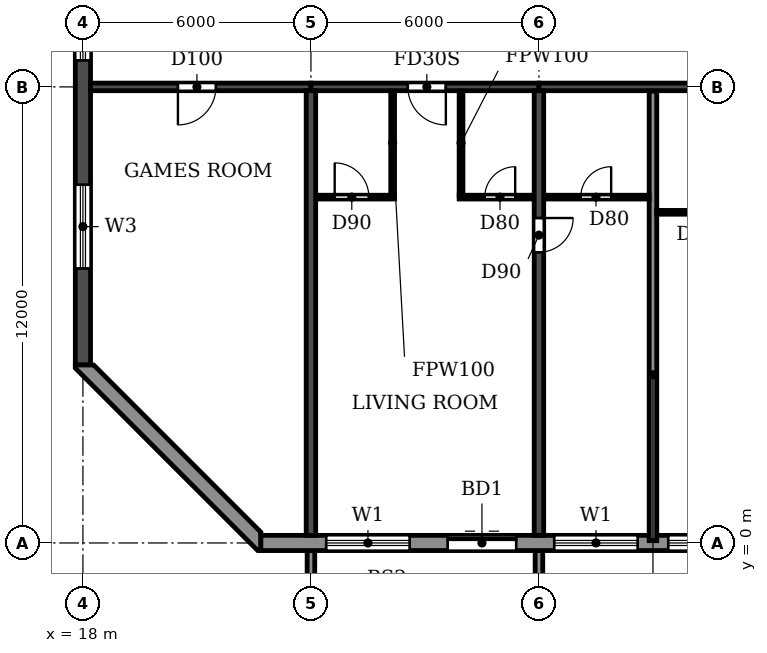
"""IFC4 building model, lengths in metres.
Left out: names, types, materials, properties, quantities, classifications, styles, units other than length and angle.
Written with IfcOpenShell. Run it as: python <this file> out.ifc"""

import sys

from ifc_helpers import new_model, si_unit, direction, frame, frame_2d, origin, place, context, subcontext, project, spatial, polyline, rectangle, outline, extrude, source, transform, mapped, element, fill, save


model = new_model("IFC4")
c1 = context("Model", 3, precision=1e-05, world=origin(), true_north=direction((0.0, 1.0)))
c2 = subcontext(c1, "Body", "Model", "MODEL_VIEW")
j1 = project(units=[si_unit("LENGTHUNIT", "METRE"), si_unit("PLANEANGLEUNIT", "RADIAN")], contexts=[c1])
p1 = place(None, origin())
s1 = spatial("IfcSite", under=j1, at=p1, CompositionType="ELEMENT")
p2 = place(p1, origin())
s2 = spatial("IfcBuilding", under=s1, at=p2, CompositionType="ELEMENT")
p3 = place(p2, frame((0.0, 0.0, 241.2)))
s3 = spatial("IfcBuildingStorey", under=s2, at=p3, CompositionType="ELEMENT", Elevation=241.2)
p4 = place(p3, frame((24.0, 0.2, 0.0), z_axis=(0.0, 0.0, 1.0), x_axis=(0.0, 1.0, 0.0)))
e1 = element("IfcWall", 1, at=p4, inside=s3, PredefinedType="SHEAR", context=c2, shape_type="SweptSolid", body=[
    extrude(rectangle(XDim=11.7, YDim=0.25, at=frame_2d((5.85, 0.0))), origin(), (0.0, 0.0, 1.0), 3.08),
])
p5 = place(p3, frame((30.0, 0.2, 0.0), z_axis=(0.0, 0.0, 1.0), x_axis=(0.0, 1.0, 0.0)))
e2 = element("IfcWall", 2, at=p5, inside=s3, PredefinedType="SHEAR", context=c2, shape_type="SweptSolid", body=[
    extrude(rectangle(XDim=11.7, YDim=0.25, at=frame_2d((5.85, 0.0))), origin(), (0.0, 0.0, 1.0), 3.08),
])
p6 = place(p5, frame((7.45, 0.0, 0.0)))
e3 = element("IfcOpeningElement", 3, at=p6, cuts=e2, PredefinedType="OPENING", context=c2, shape_type="SweptSolid", body=[
    extrude(rectangle(XDim=0.9, YDim=2.1, at=frame_2d((0.45, 1.05))), frame((0.0, 0.135, 0.0), z_axis=(0.0, -1.0, 0.0), x_axis=(1.0, 0.0, 0.0)), (0.0, 0.0, 1.0), 0.27),
])
p7 = place(p3, frame((18.0, 4.683, 0.0), z_axis=(0.0, 0.0, 1.0), x_axis=(0.0, 1.0, 0.0)))
e4 = element("IfcWall", 4, at=p7, inside=s3, PredefinedType="SHEAR", context=c2, shape_type="SweptSolid", body=[
    extrude(rectangle(XDim=31.834, YDim=0.4, at=frame_2d((15.917, 0.0))), origin(), (0.0, 0.0, 1.0), 3.08),
])
p8 = place(p7, frame((23.817, 0.0, 0.9)))
e5 = element("IfcOpeningElement", 5, at=p8, cuts=e4, PredefinedType="OPENING", context=c2, shape_type="SweptSolid", body=[
    extrude(rectangle(XDim=1.2, YDim=1.5, at=frame_2d((0.6, 0.75))), frame((0.0, 0.21, 0.0), z_axis=(0.0, -1.0, 0.0), x_axis=(1.0, 0.0, 0.0)), (0.0, 0.0, 1.0), 0.42),
])
p9 = place(p7, frame((8.017, 0.0, 0.9)))
e6 = element("IfcOpeningElement", 6, at=p9, cuts=e4, PredefinedType="OPENING", context=c2, shape_type="SweptSolid", body=[
    extrude(rectangle(XDim=1.2, YDim=1.5, at=frame_2d((0.6, 0.75))), frame((0.0, 0.21, 0.0), z_axis=(0.0, -1.0, 0.0), x_axis=(1.0, 0.0, 0.0)), (0.0, 0.0, 1.0), 0.42),
])
p10 = place(p7, frame((27.694, 0.0, 0.6)))
e7 = element("IfcOpeningElement", 7, at=p10, cuts=e4, PredefinedType="OPENING", context=c2, shape_type="SweptSolid", body=[
    extrude(rectangle(XDim=2.2, YDim=1.8, at=frame_2d((1.1, 0.9))), frame((0.0, 0.21, 0.0), z_axis=(0.0, -1.0, 0.0), x_axis=(1.0, 0.0, 0.0)), (0.0, 0.0, 1.0), 0.42),
])
p11 = place(p7, frame((2.541, 0.0, 0.6)))
e8 = element("IfcOpeningElement", 8, at=p11, cuts=e4, PredefinedType="OPENING", context=c2, shape_type="SweptSolid", body=[
    extrude(rectangle(XDim=2.2, YDim=1.8, at=frame_2d((1.1, 0.9))), frame((0.0, 0.21, 0.0), z_axis=(0.0, -1.0, 0.0), x_axis=(1.0, 0.0, 0.0)), (0.0, 0.0, 1.0), 0.42),
])
p12 = place(p7, frame((15.917, 0.0, 0.9)))
e9 = element("IfcOpeningElement", 9, at=p12, cuts=e4, PredefinedType="OPENING", context=c2, shape_type="SweptSolid", body=[
    extrude(rectangle(XDim=1.2, YDim=1.5, at=frame_2d((0.6, 0.75))), frame((0.0, 0.21, 0.0), z_axis=(0.0, -1.0, 0.0), x_axis=(1.0, 0.0, 0.0)), (0.0, 0.0, 1.0), 0.42),
])
p13 = place(p3, frame((18.2, 12.0, 0.0), z_axis=(0.0, 0.0, 1.0), x_axis=(1.0, 0.0, 0.0)))
e10 = element("IfcWall", 10, at=p13, inside=s3, PredefinedType="SHEAR", context=c2, shape_type="SweptSolid", body=[
    extrude(rectangle(XDim=5.8, YDim=0.2, at=frame_2d((2.9, 0.0))), origin(), (0.0, 0.0, 1.0), 2.48),
])
p14 = place(p13, frame((2.3, 0.0, 0.0)))
e11 = element("IfcOpeningElement", 11, at=p14, cuts=e10, PredefinedType="OPENING", context=c2, shape_type="SweptSolid", body=[
    extrude(rectangle(XDim=1.0, YDim=2.1, at=frame_2d((0.5, 1.05))), frame((0.0, 0.11, 0.0), z_axis=(0.0, -1.0, 0.0), x_axis=(1.0, 0.0, 0.0)), (0.0, 0.0, 1.0), 0.22),
])
p15 = place(p3, frame((24.0, 12.0, 0.0), z_axis=(0.0, 0.0, 1.0), x_axis=(1.0, 0.0, 0.0)))
e12 = element("IfcWall", 12, at=p15, inside=s3, PredefinedType="SHEAR", context=c2, shape_type="SweptSolid", body=[
    extrude(rectangle(XDim=6.0, YDim=0.2, at=frame_2d((3.0, 0.0))), origin(), (0.0, 0.0, 1.0), 2.48),
])
p16 = place(p15, frame((2.55, 0.0, 0.0)))
e13 = element("IfcOpeningElement", 13, at=p16, cuts=e12, PredefinedType="OPENING", context=c2, shape_type="SweptSolid", body=[
    extrude(rectangle(XDim=1.0, YDim=2.1, at=frame_2d((0.5, 1.05))), frame((0.0, 0.11, 0.0), z_axis=(0.0, -1.0, 0.0), x_axis=(1.0, 0.0, 0.0)), (0.0, 0.0, 1.0), 0.22),
])
p17 = place(p3, frame((30.0, 12.0, 0.0), z_axis=(0.0, 0.0, 1.0), x_axis=(1.0, 0.0, 0.0)))
e14 = element("IfcWall", 14, at=p17, inside=s3, PredefinedType="SHEAR", context=c2, shape_type="SweptSolid", body=[
    extrude(rectangle(XDim=6.0, YDim=0.2, at=frame_2d((3.0, 0.0))), origin(), (0.0, 0.0, 1.0), 2.48),
])
p18 = place(p3, frame((22.683, 0.0, 0.0), z_axis=(0.0, 0.0, 1.0), x_axis=(1.0, 0.0, 0.0)))
e15 = element("IfcWall", 15, at=p18, inside=s3, PredefinedType="STANDARD", context=c2, shape_type="SweptSolid", body=[
    extrude(rectangle(XDim=56.634, YDim=0.4, at=frame_2d((28.317, 0.0))), origin(), (0.0, 0.0, 1.0), 3.08),
])
p19 = place(p18, frame((1.717, 0.0, 0.9)))
e16 = element("IfcOpeningElement", 16, at=p19, cuts=e15, PredefinedType="OPENING", context=c2, shape_type="SweptSolid", body=[
    extrude(rectangle(XDim=2.2, YDim=1.5, at=frame_2d((1.1, 0.75))), frame((0.0, 0.21, 0.0), z_axis=(0.0, -1.0, 0.0), x_axis=(1.0, 0.0, 0.0)), (0.0, 0.0, 1.0), 0.42),
])
p20 = place(p18, frame((4.917, 0.0, 0.0)))
e17 = element("IfcOpeningElement", 17, at=p20, cuts=e15, PredefinedType="OPENING", context=c2, shape_type="SweptSolid", body=[
    extrude(rectangle(XDim=1.8, YDim=2.4, at=frame_2d((0.9, 1.2))), frame((0.0, 0.21, 0.0), z_axis=(0.0, -1.0, 0.0), x_axis=(1.0, 0.0, 0.0)), (0.0, 0.0, 1.0), 0.42),
])
p21 = place(p18, frame((7.717, 0.0, 0.9)))
e18 = element("IfcOpeningElement", 18, at=p21, cuts=e15, PredefinedType="OPENING", context=c2, shape_type="SweptSolid", body=[
    extrude(rectangle(XDim=2.2, YDim=1.5, at=frame_2d((1.1, 0.75))), frame((0.0, 0.21, 0.0), z_axis=(0.0, -1.0, 0.0), x_axis=(1.0, 0.0, 0.0)), (0.0, 0.0, 1.0), 0.42),
])
p22 = place(p18, frame((10.717, 0.0, 0.9)))
e19 = element("IfcOpeningElement", 19, at=p22, cuts=e15, PredefinedType="OPENING", context=c2, shape_type="SweptSolid", body=[
    extrude(rectangle(XDim=2.2, YDim=1.5, at=frame_2d((1.1, 0.75))), frame((0.0, 0.21, 0.0), z_axis=(0.0, -1.0, 0.0), x_axis=(1.0, 0.0, 0.0)), (0.0, 0.0, 1.0), 0.42),
])
p23 = place(p18, frame((13.717, 0.0, 0.9)))
e20 = element("IfcOpeningElement", 20, at=p23, cuts=e15, PredefinedType="OPENING", context=c2, shape_type="SweptSolid", body=[
    extrude(rectangle(XDim=2.2, YDim=1.5, at=frame_2d((1.1, 0.75))), frame((0.0, 0.21, 0.0), z_axis=(0.0, -1.0, 0.0), x_axis=(1.0, 0.0, 0.0)), (0.0, 0.0, 1.0), 0.42),
])
p24 = place(p18, frame((16.917, 0.0, 0.0)))
e21 = element("IfcOpeningElement", 21, at=p24, cuts=e15, PredefinedType="OPENING", context=c2, shape_type="SweptSolid", body=[
    extrude(rectangle(XDim=1.8, YDim=2.4, at=frame_2d((0.9, 1.2))), frame((0.0, 0.21, 0.0), z_axis=(0.0, -1.0, 0.0), x_axis=(1.0, 0.0, 0.0)), (0.0, 0.0, 1.0), 0.42),
])
p25 = place(p18, frame((19.717, 0.0, 0.9)))
e22 = element("IfcOpeningElement", 22, at=p25, cuts=e15, PredefinedType="OPENING", context=c2, shape_type="SweptSolid", body=[
    extrude(rectangle(XDim=2.2, YDim=1.5, at=frame_2d((1.1, 0.75))), frame((0.0, 0.21, 0.0), z_axis=(0.0, -1.0, 0.0), x_axis=(1.0, 0.0, 0.0)), (0.0, 0.0, 1.0), 0.42),
])
p26 = place(p18, frame((22.717, 0.0, 0.9)))
e23 = element("IfcOpeningElement", 23, at=p26, cuts=e15, PredefinedType="OPENING", context=c2, shape_type="SweptSolid", body=[
    extrude(rectangle(XDim=2.2, YDim=1.5, at=frame_2d((1.1, 0.75))), frame((0.0, 0.21, 0.0), z_axis=(0.0, -1.0, 0.0), x_axis=(1.0, 0.0, 0.0)), (0.0, 0.0, 1.0), 0.42),
])
p27 = place(p18, frame((25.717, 0.0, 0.9)))
e24 = element("IfcOpeningElement", 24, at=p27, cuts=e15, PredefinedType="OPENING", context=c2, shape_type="SweptSolid", body=[
    extrude(rectangle(XDim=2.2, YDim=1.5, at=frame_2d((1.1, 0.75))), frame((0.0, 0.21, 0.0), z_axis=(0.0, -1.0, 0.0), x_axis=(1.0, 0.0, 0.0)), (0.0, 0.0, 1.0), 0.42),
])
p28 = place(p18, frame((28.717, 0.0, 0.9)))
e25 = element("IfcOpeningElement", 25, at=p28, cuts=e15, PredefinedType="OPENING", context=c2, shape_type="SweptSolid", body=[
    extrude(rectangle(XDim=2.2, YDim=1.5, at=frame_2d((1.1, 0.75))), frame((0.0, 0.21, 0.0), z_axis=(0.0, -1.0, 0.0), x_axis=(1.0, 0.0, 0.0)), (0.0, 0.0, 1.0), 0.42),
])
p29 = place(p18, frame((31.717, 0.0, 0.9)))
e26 = element("IfcOpeningElement", 26, at=p29, cuts=e15, PredefinedType="OPENING", context=c2, shape_type="SweptSolid", body=[
    extrude(rectangle(XDim=2.2, YDim=1.5, at=frame_2d((1.1, 0.75))), frame((0.0, 0.21, 0.0), z_axis=(0.0, -1.0, 0.0), x_axis=(1.0, 0.0, 0.0)), (0.0, 0.0, 1.0), 0.42),
])
p30 = place(p18, frame((34.717, 0.0, 0.9)))
e27 = element("IfcOpeningElement", 27, at=p30, cuts=e15, PredefinedType="OPENING", context=c2, shape_type="SweptSolid", body=[
    extrude(rectangle(XDim=2.2, YDim=1.5, at=frame_2d((1.1, 0.75))), frame((0.0, 0.21, 0.0), z_axis=(0.0, -1.0, 0.0), x_axis=(1.0, 0.0, 0.0)), (0.0, 0.0, 1.0), 0.42),
])
p31 = place(p18, frame((37.917, 0.0, 0.0)))
e28 = element("IfcOpeningElement", 28, at=p31, cuts=e15, PredefinedType="OPENING", context=c2, shape_type="SweptSolid", body=[
    extrude(rectangle(XDim=1.8, YDim=2.4, at=frame_2d((0.9, 1.2))), frame((0.0, 0.21, 0.0), z_axis=(0.0, -1.0, 0.0), x_axis=(1.0, 0.0, 0.0)), (0.0, 0.0, 1.0), 0.42),
])
p32 = place(p18, frame((40.717, 0.0, 0.9)))
e29 = element("IfcOpeningElement", 29, at=p32, cuts=e15, PredefinedType="OPENING", context=c2, shape_type="SweptSolid", body=[
    extrude(rectangle(XDim=2.2, YDim=1.5, at=frame_2d((1.1, 0.75))), frame((0.0, 0.21, 0.0), z_axis=(0.0, -1.0, 0.0), x_axis=(1.0, 0.0, 0.0)), (0.0, 0.0, 1.0), 0.42),
])
p33 = place(p18, frame((43.717, 0.0, 0.9)))
e30 = element("IfcOpeningElement", 30, at=p33, cuts=e15, PredefinedType="OPENING", context=c2, shape_type="SweptSolid", body=[
    extrude(rectangle(XDim=2.2, YDim=1.5, at=frame_2d((1.1, 0.75))), frame((0.0, 0.21, 0.0), z_axis=(0.0, -1.0, 0.0), x_axis=(1.0, 0.0, 0.0)), (0.0, 0.0, 1.0), 0.42),
])
p34 = place(p18, frame((46.717, 0.0, 0.9)))
e31 = element("IfcOpeningElement", 31, at=p34, cuts=e15, PredefinedType="OPENING", context=c2, shape_type="SweptSolid", body=[
    extrude(rectangle(XDim=2.2, YDim=1.5, at=frame_2d((1.1, 0.75))), frame((0.0, 0.21, 0.0), z_axis=(0.0, -1.0, 0.0), x_axis=(1.0, 0.0, 0.0)), (0.0, 0.0, 1.0), 0.42),
])
p35 = place(p18, frame((49.717, 0.0, 0.9)))
e32 = element("IfcOpeningElement", 32, at=p35, cuts=e15, PredefinedType="OPENING", context=c2, shape_type="SweptSolid", body=[
    extrude(rectangle(XDim=2.2, YDim=1.5, at=frame_2d((1.1, 0.75))), frame((0.0, 0.21, 0.0), z_axis=(0.0, -1.0, 0.0), x_axis=(1.0, 0.0, 0.0)), (0.0, 0.0, 1.0), 0.42),
])
p36 = place(p18, frame((52.917, 0.0, 0.0)))
e33 = element("IfcOpeningElement", 33, at=p36, cuts=e15, PredefinedType="OPENING", context=c2, shape_type="SweptSolid", body=[
    extrude(rectangle(XDim=1.8, YDim=2.4, at=frame_2d((0.9, 1.2))), frame((0.0, 0.21, 0.0), z_axis=(0.0, -1.0, 0.0), x_axis=(1.0, 0.0, 0.0)), (0.0, 0.0, 1.0), 0.42),
])
p37 = place(p3, origin())
e34 = element("IfcWall", 34, at=p37, inside=s3, PredefinedType="STANDARD", context=c2, shape_type="SweptSolid", body=[
    extrude(outline(polyline([(17.8, 4.683), (17.8, 4.6), (22.6, -0.2), (22.683, -0.2), (22.683, 0.283), (18.283, 4.683), (17.8, 4.683)])), origin(), (0.0, 0.0, 1.0), 3.08),
])
m1 = source(origin(), c2, "Body", "SweptSolid", [
    extrude(outline(polyline([(0.0, 0.0), (0.2, 0.0), (0.2, 1.65), (0.0, 1.65), (0.0, 0.0)])), origin(), (0.0, 0.0, 1.0), 3.1),
])
for number, where in (
    (35, (23.9, -1.85, 0.0)),
    (36, (29.9, -1.85, 0.0)),
):
    element("IfcWall", number, at=place(p3, frame(where)), inside=s3, PredefinedType="STANDARD", context=c2, shape_type="MappedRepresentation", body=[
        mapped(m1, transform((0.0, 0.0, 0.0))),
    ])
p38 = place(p3, frame((33.0, 0.06, 0.0), z_axis=(0.0, 0.0, 1.0), x_axis=(0.0, 1.0, 0.0)))
e37 = element("IfcWall", 37, at=p38, inside=s3, PredefinedType="PARTITIONING", context=c2, shape_type="SweptSolid", body=[
    extrude(rectangle(XDim=11.83, YDim=0.2, at=frame_2d((5.915, 0.0))), origin(), (0.0, 0.0, 1.0), 3.08),
])
p39 = place(p3, frame((33.1, 8.7, 0.0), z_axis=(0.0, 0.0, 1.0), x_axis=(1.0, 0.0, 0.0)))
e38 = element("IfcWall", 38, at=p39, inside=s3, PredefinedType="PARTITIONING", context=c2, shape_type="SweptSolid", body=[
    extrude(rectangle(XDim=2.765, YDim=0.1, at=frame_2d((1.382, 0.0))), origin(), (0.0, 0.0, 1.0), 3.08),
])
p40 = place(p39, frame((1.0, 0.0, 0.0)))
e39 = element("IfcOpeningElement", 39, at=p40, cuts=e38, PredefinedType="OPENING", context=c2, shape_type="SweptSolid", body=[
    extrude(rectangle(XDim=0.8, YDim=2.1, at=frame_2d((0.4, 1.05))), frame((0.0, 0.06, 0.0), z_axis=(0.0, -1.0, 0.0), x_axis=(1.0, 0.0, 0.0)), (0.0, 0.0, 1.0), 0.12),
])
p41 = place(p3, frame((24.135, 9.1, 0.0), z_axis=(0.0, 0.0, 1.0), x_axis=(1.0, 0.0, 0.0)))
e40 = element("IfcWall", 40, at=p41, inside=s3, PredefinedType="PARTITIONING", context=c2, shape_type="SweptSolid", body=[
    extrude(rectangle(XDim=2.065, YDim=0.1, at=frame_2d((1.032, 0.0))), origin(), (0.0, 0.0, 1.0), 3.08),
])
p42 = place(p41, frame((0.49, 0.0, 0.0)))
e41 = element("IfcOpeningElement", 41, at=p42, cuts=e40, PredefinedType="OPENING", context=c2, shape_type="SweptSolid", body=[
    extrude(rectangle(XDim=0.9, YDim=2.1, at=frame_2d((0.45, 1.05))), frame((0.0, 0.06, 0.0), z_axis=(0.0, -1.0, 0.0), x_axis=(1.0, 0.0, 0.0)), (0.0, 0.0, 1.0), 0.12),
])
p43 = place(p3, frame((27.9, 9.1, 0.0), z_axis=(0.0, 0.0, 1.0), x_axis=(1.0, 0.0, 0.0)))
e42 = element("IfcWall", 42, at=p43, inside=s3, PredefinedType="PARTITIONING", context=c2, shape_type="SweptSolid", body=[
    extrude(rectangle(XDim=1.965, YDim=0.1, at=frame_2d((0.982, 0.0))), origin(), (0.0, 0.0, 1.0), 3.08),
])
p44 = place(p43, frame((0.675, 0.0, 0.0)))
e43 = element("IfcOpeningElement", 43, at=p44, cuts=e42, PredefinedType="OPENING", context=c2, shape_type="SweptSolid", body=[
    extrude(rectangle(XDim=0.8, YDim=2.1, at=frame_2d((0.4, 1.05))), frame((0.0, 0.06, 0.0), z_axis=(0.0, -1.0, 0.0), x_axis=(1.0, 0.0, 0.0)), (0.0, 0.0, 1.0), 0.12),
])
p45 = place(p3, frame((30.135, 9.1, 0.0), z_axis=(0.0, 0.0, 1.0), x_axis=(1.0, 0.0, 0.0)))
e44 = element("IfcWall", 44, at=p45, inside=s3, PredefinedType="PARTITIONING", context=c2, shape_type="SweptSolid", body=[
    extrude(rectangle(XDim=2.765, YDim=0.1, at=frame_2d((1.382, 0.0))), origin(), (0.0, 0.0, 1.0), 3.08),
])
p46 = place(p45, frame((0.965, 0.0, 0.0)))
e45 = element("IfcOpeningElement", 45, at=p46, cuts=e44, PredefinedType="OPENING", context=c2, shape_type="SweptSolid", body=[
    extrude(rectangle(XDim=0.8, YDim=2.1, at=frame_2d((0.4, 1.05))), frame((0.0, 0.06, 0.0), z_axis=(0.0, -1.0, 0.0), x_axis=(1.0, 0.0, 0.0)), (0.0, 0.0, 1.0), 0.12),
])
for number, where, z_axis, x_axis in (
    (46, (26.15, 9.15, 0.0), (0.0, 0.0, 1.0), (0.0, 1.0, 0.0)),
    (47, (27.95, 9.15, 0.0), (0.0, 0.0, 1.0), (0.0, 1.0, 0.0)),
):
    element("IfcWall", number, at=place(p3, frame(where, z_axis=z_axis, x_axis=x_axis)), inside=s3, PredefinedType="PARTITIONING", context=c2, shape_type="SweptSolid", body=[
        extrude(rectangle(XDim=2.74, YDim=0.1, at=frame_2d((1.37, 0.0))), origin(), (0.0, 0.0, 1.0), 3.08),
    ])
p47 = place(p19, origin())
e48 = element("IfcWindow", 48, at=p47, inside=s3, PartitioningType="DOUBLE_PANEL_HORIZONTAL", PredefinedType="WINDOW", context=c2, shape_type="SweptSolid", body=[
    extrude(rectangle(XDim=2.2, YDim=1.5, at=frame_2d((1.1, 0.75))), frame((0.0, 0.03, 0.0), z_axis=(0.0, -1.0, 0.0), x_axis=(1.0, 0.0, 0.0)), (0.0, 0.0, 1.0), 0.06),
])
fill(e16, e48)
p48 = place(p20, origin())
e49 = element("IfcDoor", 49, at=p48, inside=s3, OperationType="DOUBLE_DOOR_SLIDING", PredefinedType="DOOR", context=c2, shape_type="SweptSolid", body=[
    extrude(rectangle(XDim=1.8, YDim=2.4, at=frame_2d((0.9, 1.2))), frame((0.0, 0.025, 0.0), z_axis=(0.0, -1.0, 0.0), x_axis=(1.0, 0.0, 0.0)), (0.0, 0.0, 1.0), 0.05),
])
fill(e17, e49)
p49 = place(p21, origin())
e50 = element("IfcWindow", 50, at=p49, inside=s3, PartitioningType="DOUBLE_PANEL_HORIZONTAL", PredefinedType="WINDOW", context=c2, shape_type="SweptSolid", body=[
    extrude(rectangle(XDim=2.2, YDim=1.5, at=frame_2d((1.1, 0.75))), frame((0.0, 0.03, 0.0), z_axis=(0.0, -1.0, 0.0), x_axis=(1.0, 0.0, 0.0)), (0.0, 0.0, 1.0), 0.06),
])
fill(e18, e50)
p50 = place(p22, origin())
e51 = element("IfcWindow", 51, at=p50, inside=s3, PartitioningType="DOUBLE_PANEL_HORIZONTAL", PredefinedType="WINDOW", context=c2, shape_type="SweptSolid", body=[
    extrude(rectangle(XDim=2.2, YDim=1.5, at=frame_2d((1.1, 0.75))), frame((0.0, 0.03, 0.0), z_axis=(0.0, -1.0, 0.0), x_axis=(1.0, 0.0, 0.0)), (0.0, 0.0, 1.0), 0.06),
])
fill(e19, e51)
p51 = place(p9, origin())
e52 = element("IfcWindow", 52, at=p51, inside=s3, PartitioningType="SINGLE_PANEL", PredefinedType="WINDOW", context=c2, shape_type="SweptSolid", body=[
    extrude(rectangle(XDim=1.2, YDim=1.5, at=frame_2d((0.6, 0.75))), frame((0.0, 0.03, 0.0), z_axis=(0.0, -1.0, 0.0), x_axis=(1.0, 0.0, 0.0)), (0.0, 0.0, 1.0), 0.06),
])
fill(e6, e52)
p52 = place(p11, origin())
e53 = element("IfcWindow", 53, at=p52, inside=s3, PartitioningType="DOUBLE_PANEL_HORIZONTAL", PredefinedType="WINDOW", context=c2, shape_type="SweptSolid", body=[
    extrude(rectangle(XDim=2.2, YDim=1.8, at=frame_2d((1.1, 0.9))), frame((0.0, 0.03, 0.0), z_axis=(0.0, -1.0, 0.0), x_axis=(1.0, 0.0, 0.0)), (0.0, 0.0, 1.0), 0.06),
])
fill(e8, e53)
p53 = place(p14, frame((1.0, 0.0, 0.0), z_axis=(0.0, 0.0, 1.0), x_axis=(-1.0, 0.0, 0.0)))
e54 = element("IfcDoor", 54, at=p53, inside=s3, OperationType="SINGLE_SWING_RIGHT", PredefinedType="DOOR", context=c2, shape_type="SweptSolid", body=[
    extrude(rectangle(XDim=1.0, YDim=2.1, at=frame_2d((0.5, 1.05))), frame((0.0, 0.025, 0.0), z_axis=(0.0, -1.0, 0.0), x_axis=(1.0, 0.0, 0.0)), (0.0, 0.0, 1.0), 0.05),
])
fill(e11, e54)
p54 = place(p46, origin())
e55 = element("IfcDoor", 55, at=p54, inside=s3, OperationType="SINGLE_SWING_RIGHT", PredefinedType="DOOR", context=c2, shape_type="SweptSolid", body=[
    extrude(rectangle(XDim=0.8, YDim=2.1, at=frame_2d((0.4, 1.05))), frame((0.0, 0.025, 0.0), z_axis=(0.0, -1.0, 0.0), x_axis=(1.0, 0.0, 0.0)), (0.0, 0.0, 1.0), 0.05),
])
fill(e45, e55)
p55 = place(p42, origin())
e56 = element("IfcDoor", 56, at=p55, inside=s3, OperationType="SINGLE_SWING_LEFT", PredefinedType="DOOR", context=c2, shape_type="SweptSolid", body=[
    extrude(rectangle(XDim=0.9, YDim=2.1, at=frame_2d((0.45, 1.05))), frame((0.0, 0.025, 0.0), z_axis=(0.0, -1.0, 0.0), x_axis=(1.0, 0.0, 0.0)), (0.0, 0.0, 1.0), 0.05),
])
fill(e41, e56)
p56 = place(p16, frame((1.0, 0.0, 0.0), z_axis=(0.0, 0.0, 1.0), x_axis=(-1.0, 0.0, 0.0)))
e57 = element("IfcDoor", 57, at=p56, inside=s3, OperationType="SINGLE_SWING_LEFT", PredefinedType="DOOR", context=c2, shape_type="SweptSolid", body=[
    extrude(rectangle(XDim=1.0, YDim=2.1, at=frame_2d((0.5, 1.05))), frame((0.0, 0.025, 0.0), z_axis=(0.0, -1.0, 0.0), x_axis=(1.0, 0.0, 0.0)), (0.0, 0.0, 1.0), 0.05),
])
fill(e13, e57)
p57 = place(p44, origin())
e58 = element("IfcDoor", 58, at=p57, inside=s3, OperationType="SINGLE_SWING_RIGHT", PredefinedType="DOOR", context=c2, shape_type="SweptSolid", body=[
    extrude(rectangle(XDim=0.8, YDim=2.1, at=frame_2d((0.4, 1.05))), frame((0.0, 0.025, 0.0), z_axis=(0.0, -1.0, 0.0), x_axis=(1.0, 0.0, 0.0)), (0.0, 0.0, 1.0), 0.05),
])
fill(e43, e58)
p58 = place(p6, frame((0.9, 0.0, 0.0), z_axis=(0.0, 0.0, 1.0), x_axis=(-1.0, 0.0, 0.0)))
e59 = element("IfcDoor", 59, at=p58, inside=s3, OperationType="SINGLE_SWING_LEFT", PredefinedType="DOOR", context=c2, shape_type="SweptSolid", body=[
    extrude(rectangle(XDim=0.9, YDim=2.1, at=frame_2d((0.45, 1.05))), frame((0.0, 0.025, 0.0), z_axis=(0.0, -1.0, 0.0), x_axis=(1.0, 0.0, 0.0)), (0.0, 0.0, 1.0), 0.05),
])
fill(e3, e59)
save(model, sys.argv[1])
